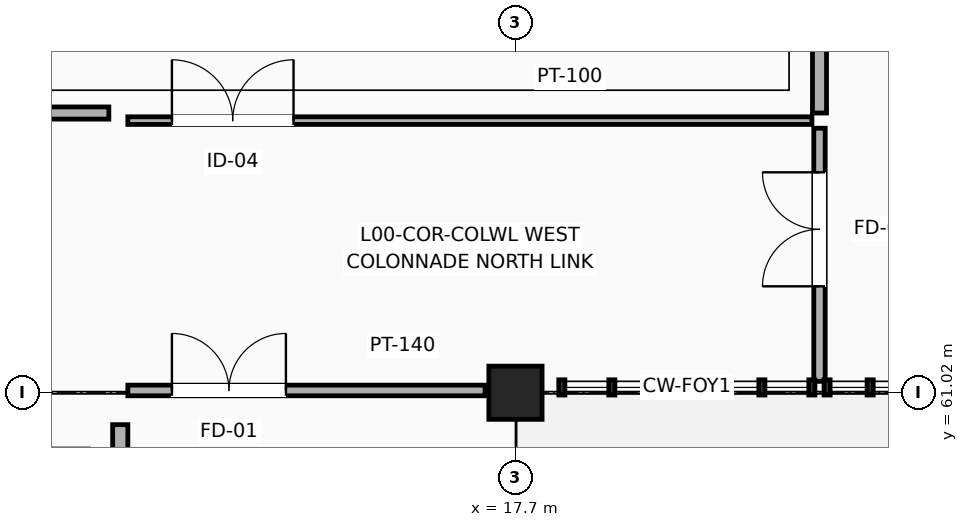
"""IFC4 building model, lengths in metres.
Left out: names, types, materials, properties, quantities, classifications, styles, units other than length and angle.
Written with IfcOpenShell. Run it as: python <this file> out.ifc"""

import sys

from ifc_helpers import new_model, si_unit, direction, frame, frame_2d, origin, origin_2d, place, context, subcontext, project, spatial, rectangle, extrude, element, fill, save


model = new_model("IFC4")
c1 = context("Model", 3, precision=1e-05, world=origin(), true_north=direction((0.0, 1.0)))
c2 = subcontext(c1, "Body", "Model", "MODEL_VIEW")
j1 = project(units=[si_unit("LENGTHUNIT", "METRE"), si_unit("PLANEANGLEUNIT", "RADIAN")], contexts=[c1])
p1 = place(None, origin())
s1 = spatial("IfcSite", under=j1, at=p1, CompositionType="ELEMENT")
p2 = place(p1, origin())
s2 = spatial("IfcBuilding", under=s1, at=p2, CompositionType="ELEMENT")
p3 = place(p2, origin())
s3 = spatial("IfcBuildingStorey", under=s2, at=p3, CompositionType="ELEMENT", Elevation=0.0)
p4 = place(p3, frame((17.7, 61.02, 0.0), z_axis=(0.0, 0.0, 1.0), x_axis=(1.0, 0.0, 0.0)))
e1 = element("IfcColumn", 1, at=p4, inside=s3, PredefinedType="COLUMN", context=c2, shape_type="SweptSolid", body=[
    extrude(rectangle(XDim=0.7, YDim=0.7, at=origin_2d()), origin(), (0.0, 0.0, 1.0), 5.4),
])
p5 = place(p3, frame((12.5, 31.43, 0.0), z_axis=(0.0, 0.0, 1.0), x_axis=(0.0, 1.0, 0.0)))
e2 = element("IfcWall", 2, at=p5, inside=s3, PredefinedType="PARTITIONING", context=c2, shape_type="SweptSolid", body=[
    extrude(rectangle(XDim=29.17, YDim=0.2, at=frame_2d((14.585, 0.0))), origin(), (0.0, 0.0, 1.0), 4.137),
])
p6 = place(p5, frame((25.143, 0.0, 0.0)))
e3 = element("IfcOpeningElement", 3, at=p6, cuts=e2, PredefinedType="OPENING", context=c2, shape_type="SweptSolid", body=[
    extrude(rectangle(XDim=1.45, YDim=2.3, at=frame_2d((0.725, 1.15))), frame((0.0, 0.11, 0.0), z_axis=(0.0, -1.0, 0.0), x_axis=(1.0, 0.0, 0.0)), (0.0, 0.0, 1.0), 0.22),
])
p7 = place(p3, frame((12.6, 61.05, 0.0), z_axis=(0.0, 0.0, 1.0), x_axis=(1.0, 0.0, 0.0)))
e4 = element("IfcWall", 4, at=p7, inside=s3, PredefinedType="PARTITIONING", context=c2, shape_type="SweptSolid", body=[
    extrude(rectangle(XDim=4.7, YDim=0.14, at=frame_2d((2.35, 0.0))), origin(), (0.0, 0.0, 1.0), 4.137),
])
p8 = place(p7, frame((0.58, 0.0, 0.0)))
e5 = element("IfcOpeningElement", 5, at=p8, cuts=e4, PredefinedType="OPENING", context=c2, shape_type="SweptSolid", body=[
    extrude(rectangle(XDim=1.5, YDim=2.2, at=frame_2d((0.75, 1.1))), frame((0.0, 0.08, 0.0), z_axis=(0.0, -1.0, 0.0), x_axis=(1.0, 0.0, 0.0)), (0.0, 0.0, 1.0), 0.16),
])
p9 = place(p3, frame((12.6, 64.6, 0.0), z_axis=(0.0, 0.0, 1.0), x_axis=(1.0, 0.0, 0.0)))
e6 = element("IfcWall", 6, at=p9, inside=s3, PredefinedType="PARTITIONING", context=c2, shape_type="SweptSolid", body=[
    extrude(rectangle(XDim=9.0, YDim=0.1, at=frame_2d((4.5, 0.0))), origin(), (0.0, 0.0, 1.0), 4.337),
])
p10 = place(p9, frame((0.58, 0.0, 0.0)))
e7 = element("IfcOpeningElement", 7, at=p10, cuts=e6, PredefinedType="OPENING", context=c2, shape_type="SweptSolid", body=[
    extrude(rectangle(XDim=1.6, YDim=2.3, at=frame_2d((0.8, 1.15))), frame((0.0, 0.06, 0.0), z_axis=(0.0, -1.0, 0.0), x_axis=(1.0, 0.0, 0.0)), (0.0, 0.0, 1.0), 0.12),
])
p11 = place(p3, frame((21.7, 61.17, 0.0), z_axis=(0.0, 0.0, 1.0), x_axis=(0.0, 1.0, 0.0)))
e8 = element("IfcWall", 8, at=p11, inside=s3, PredefinedType="MOVABLE", context=c2, shape_type="SweptSolid", body=[
    extrude(rectangle(XDim=3.33, YDim=0.15, at=frame_2d((1.665, 0.0))), origin(), (0.0, 0.0, 1.0), 4.137),
])
p12 = place(p11, frame((1.25, 0.0, 0.0)))
e9 = element("IfcOpeningElement", 9, at=p12, cuts=e8, PredefinedType="OPENING", context=c2, shape_type="SweptSolid", body=[
    extrude(rectangle(XDim=1.5, YDim=2.2, at=frame_2d((0.75, 1.1))), frame((0.0, 0.085, 0.0), z_axis=(0.0, -1.0, 0.0), x_axis=(1.0, 0.0, 0.0)), (0.0, 0.0, 1.0), 0.17),
])
p13 = place(p3, frame((21.7, 64.7, 0.0), z_axis=(0.0, 0.0, 1.0), x_axis=(0.0, 1.0, 0.0)))
e10 = element("IfcWall", 10, at=p13, inside=s3, PredefinedType="PARTITIONING", context=c2, shape_type="SweptSolid", body=[
    extrude(rectangle(XDim=18.1, YDim=0.185, at=frame_2d((9.05, 0.0))), origin(), (0.0, 0.0, 1.0), 4.137),
])
p14 = place(p13, frame((6.936, 0.0, 0.0)))
e11 = element("IfcOpeningElement", 11, at=p14, cuts=e10, PredefinedType="OPENING", context=c2, shape_type="SweptSolid", body=[
    extrude(rectangle(XDim=1.05, YDim=2.25, at=frame_2d((0.525, 1.125))), frame((0.0, 0.103, 0.0), z_axis=(0.0, -1.0, 0.0), x_axis=(1.0, 0.0, 0.0)), (0.0, 0.0, 1.0), 0.205),
])
p15 = place(p3, frame((2.0, 64.7, 0.0), z_axis=(0.0, 0.0, 1.0), x_axis=(1.0, 0.0, 0.0)))
e12 = element("IfcWall", 12, at=p15, inside=s3, PredefinedType="PARTITIONING", context=c2, shape_type="SweptSolid", body=[
    extrude(rectangle(XDim=10.35, YDim=0.16, at=frame_2d((5.175, 0.0))), origin(), (0.0, 0.0, 1.0), 4.337),
])
p16 = place(p8, origin())
e13 = element("IfcDoor", 13, at=p16, inside=s3, OperationType="DOUBLE_DOOR_SINGLE_SWING", PredefinedType="DOOR", context=c2, shape_type="SweptSolid", body=[
    extrude(rectangle(XDim=1.5, YDim=2.2, at=frame_2d((0.75, 1.1))), frame((0.0, 0.025, 0.0), z_axis=(0.0, -1.0, 0.0), x_axis=(1.0, 0.0, 0.0)), (0.0, 0.0, 1.0), 0.05),
])
fill(e5, e13)
p17 = place(p10, origin())
e14 = element("IfcDoor", 14, at=p17, inside=s3, OperationType="DOUBLE_DOOR_SINGLE_SWING", PredefinedType="DOOR", context=c2, shape_type="SweptSolid", body=[
    extrude(rectangle(XDim=1.6, YDim=2.3, at=frame_2d((0.8, 1.15))), frame((0.0, 0.025, 0.0), z_axis=(0.0, -1.0, 0.0), x_axis=(1.0, 0.0, 0.0)), (0.0, 0.0, 1.0), 0.05),
])
fill(e7, e14)
p18 = place(p12, origin())
e15 = element("IfcDoor", 15, at=p18, inside=s3, OperationType="DOUBLE_DOOR_SINGLE_SWING", PredefinedType="DOOR", context=c2, shape_type="SweptSolid", body=[
    extrude(rectangle(XDim=1.5, YDim=2.2, at=frame_2d((0.75, 1.1))), frame((0.0, 0.025, 0.0), z_axis=(0.0, -1.0, 0.0), x_axis=(1.0, 0.0, 0.0)), (0.0, 0.0, 1.0), 0.05),
])
fill(e9, e15)
save(model, sys.argv[1])
